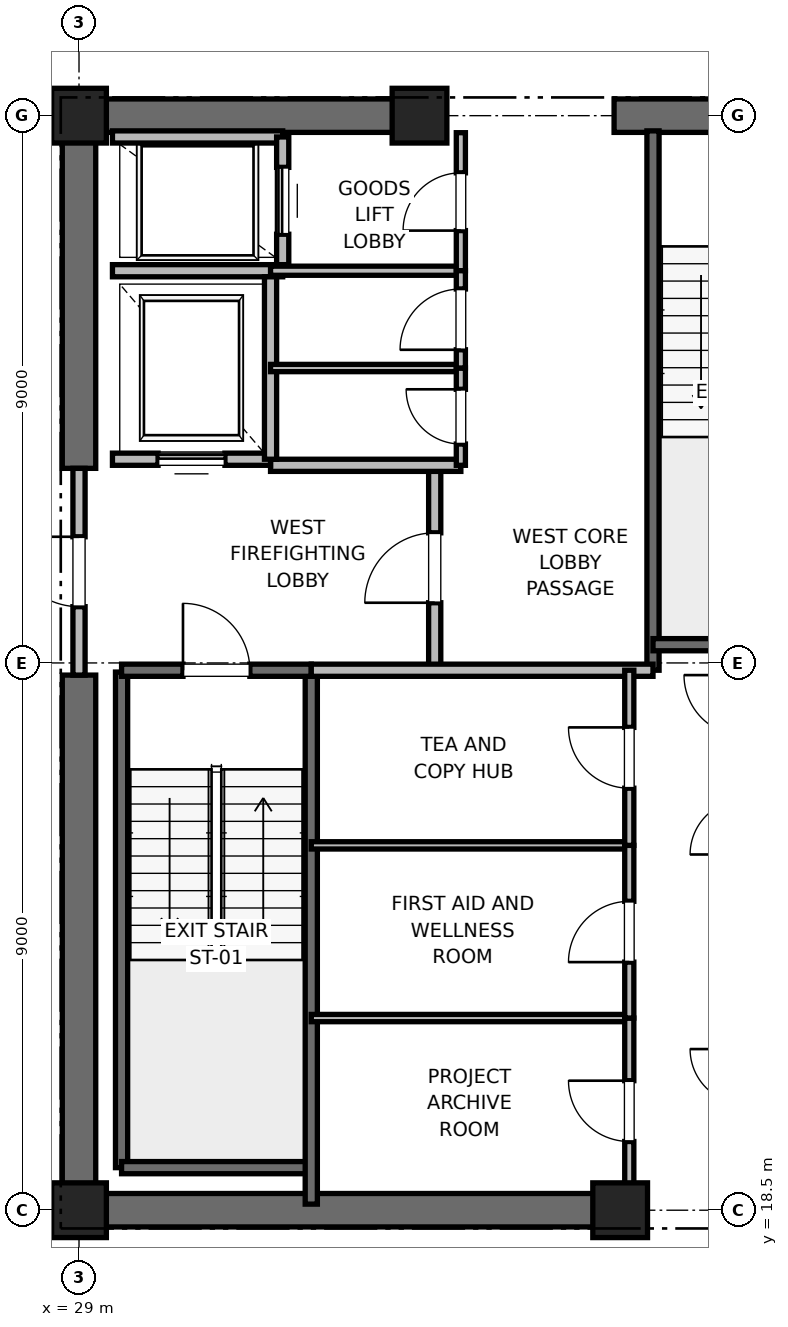
"""IFC4 building model, lengths in metres.
Left out: names, types, materials, properties, quantities, classifications, styles, units other than length and angle.
Written with IfcOpenShell. Run it as: python <this file> out.ifc"""

import sys

from ifc_helpers import new_model, si_unit, direction, frame, frame_2d, origin, origin_2d, place, context, subcontext, project, spatial, rectangle, extrude, element, fill, save


model = new_model("IFC4")
c1 = context("Model", 3, precision=1e-05, world=origin(), true_north=direction((0.0, 1.0)))
c2 = subcontext(c1, "Body", "Model", "MODEL_VIEW")
j1 = project(units=[si_unit("LENGTHUNIT", "METRE"), si_unit("PLANEANGLEUNIT", "RADIAN")], contexts=[c1])
p1 = place(None, origin())
s1 = spatial("IfcSite", under=j1, at=p1, CompositionType="ELEMENT")
p2 = place(p1, origin())
s2 = spatial("IfcBuilding", under=s1, at=p2, CompositionType="ELEMENT")
p3 = place(p2, frame((0.0, 0.0, 221.2)))
s3 = spatial("IfcBuildingStorey", under=s2, at=p3, CompositionType="ELEMENT", Elevation=221.2)
for number, where, z_axis, x_axis in (
    (1, (29.0, 18.5, 0.0), (0.0, 0.0, 1.0), (1.0, 0.0, 0.0)),
    (2, (29.0, 36.5, 0.0), (0.0, 0.0, 1.0), (1.0, 0.0, 0.0)),
    (3, (37.9, 18.5, 0.0), (0.0, 0.0, 1.0), (1.0, 0.0, 0.0)),
    (4, (34.6, 36.5, 0.0), (0.0, 0.0, 1.0), (1.0, 0.0, 0.0)),
):
    element("IfcColumn", number, at=place(p3, frame(where, z_axis=z_axis, x_axis=x_axis)), inside=s3, PredefinedType="PILASTER", context=c2, shape_type="SweptSolid", body=[
        extrude(rectangle(XDim=0.9, YDim=0.9, at=origin_2d()), origin(), (0.0, 0.0, 1.0), 4.0),
    ])
p4 = place(p3, frame((29.0, 18.5, 0.0), z_axis=(0.0, 0.0, 1.0), x_axis=(1.0, 0.0, 0.0)))
e5 = element("IfcWall", 5, at=p4, inside=s3, PredefinedType="SHEAR", context=c2, shape_type="SweptSolid", body=[
    extrude(rectangle(XDim=9.2, YDim=0.55, at=frame_2d((4.6, 0.0))), origin(), (0.0, 0.0, 1.0), 3.775),
])
p5 = place(p3, frame((29.0, 36.5, 0.0), z_axis=(0.0, 0.0, 1.0), x_axis=(1.0, 0.0, 0.0)))
e6 = element("IfcWall", 6, at=p5, inside=s3, PredefinedType="SHEAR", context=c2, shape_type="SweptSolid", body=[
    extrude(rectangle(XDim=5.8, YDim=0.55, at=frame_2d((2.9, 0.0))), origin(), (0.0, 0.0, 1.0), 3.775),
])
p6 = place(p3, frame((37.8, 36.5, 0.0), z_axis=(0.0, 0.0, 1.0), x_axis=(1.0, 0.0, 0.0)))
e7 = element("IfcWall", 7, at=p6, inside=s3, PredefinedType="SHEAR", context=c2, shape_type="SweptSolid", body=[
    extrude(rectangle(XDim=4.4, YDim=0.55, at=frame_2d((2.2, 0.0))), origin(), (0.0, 0.0, 1.0), 3.775),
])
p7 = place(p6, frame((1.65, 0.0, 0.0)))
e8 = element("IfcOpeningElement", 8, at=p7, cuts=e7, PredefinedType="OPENING", context=c2, shape_type="SweptSolid", body=[
    extrude(rectangle(XDim=1.1, YDim=2.15, at=frame_2d((0.55, 1.075))), frame((0.0, 0.275, 0.0), z_axis=(0.0, -1.0, 0.0), x_axis=(1.0, 0.0, 0.0)), (0.0, 0.0, 1.0), 0.55),
])
p8 = place(p3, frame((29.0, 18.5, 0.0), z_axis=(0.0, 0.0, 1.0), x_axis=(0.0, 1.0, 0.0)))
e9 = element("IfcWall", 9, at=p8, inside=s3, PredefinedType="SHEAR", context=c2, shape_type="SweptSolid", body=[
    extrude(rectangle(XDim=8.8, YDim=0.55, at=frame_2d((4.4, 0.0))), origin(), (0.0, 0.0, 1.0), 3.775),
])
p9 = place(p3, frame((29.0, 30.7, 0.0), z_axis=(0.0, 0.0, 1.0), x_axis=(0.0, 1.0, 0.0)))
e10 = element("IfcWall", 10, at=p9, inside=s3, PredefinedType="SHEAR", context=c2, shape_type="SweptSolid", body=[
    extrude(rectangle(XDim=5.8, YDim=0.55, at=frame_2d((2.9, 0.0))), origin(), (0.0, 0.0, 1.0), 3.775),
])
p10 = place(p3, frame((29.7, 19.2, 0.0), z_axis=(0.0, 0.0, 1.0), x_axis=(0.0, 1.0, 0.0)))
e11 = element("IfcWall", 11, at=p10, inside=s3, PredefinedType="SOLIDWALL", context=c2, shape_type="SweptSolid", body=[
    extrude(rectangle(XDim=8.15, YDim=0.2, at=frame_2d((4.075, 0.0))), origin(), (0.0, 0.0, 1.0), 3.775),
])
p11 = place(p3, frame((29.7, 19.2, 0.0), z_axis=(0.0, 0.0, 1.0), x_axis=(1.0, 0.0, 0.0)))
e12 = element("IfcWall", 12, at=p11, inside=s3, PredefinedType="SOLIDWALL", context=c2, shape_type="SweptSolid", body=[
    extrude(rectangle(XDim=3.12, YDim=0.2, at=frame_2d((1.56, 0.0))), origin(), (0.0, 0.0, 1.0), 3.775),
])
p12 = place(p3, frame((32.82, 18.6, 0.0), z_axis=(0.0, 0.0, 1.0), x_axis=(0.0, 1.0, 0.0)))
e13 = element("IfcWall", 13, at=p12, inside=s3, PredefinedType="SOLIDWALL", context=c2, shape_type="SweptSolid", body=[
    extrude(rectangle(XDim=8.78, YDim=0.2, at=frame_2d((4.39, 0.0))), origin(), (0.0, 0.0, 1.0), 3.775),
])
p13 = place(p3, frame((29.7, 27.38, 0.0), z_axis=(0.0, 0.0, 1.0), x_axis=(1.0, 0.0, 0.0)))
e14 = element("IfcWall", 14, at=p13, inside=s3, PredefinedType="SOLIDWALL", context=c2, shape_type="SweptSolid", body=[
    extrude(rectangle(XDim=3.12, YDim=0.2, at=frame_2d((1.56, 0.0))), origin(), (0.0, 0.0, 1.0), 3.775),
])
p14 = place(p13, frame((1.01, 0.0, 0.0)))
e15 = element("IfcOpeningElement", 15, at=p14, cuts=e14, PredefinedType="OPENING", context=c2, shape_type="SweptSolid", body=[
    extrude(rectangle(XDim=1.1, YDim=2.15, at=frame_2d((0.55, 1.075))), frame((0.0, 0.1, 0.0), z_axis=(0.0, -1.0, 0.0), x_axis=(1.0, 0.0, 0.0)), (0.0, 0.0, 1.0), 0.2),
])
p15 = place(p3, frame((38.44, 27.38, 0.0), z_axis=(0.0, 0.0, 1.0), x_axis=(0.0, 1.0, 0.0)))
e16 = element("IfcWall", 16, at=p15, inside=s3, PredefinedType="SOLIDWALL", context=c2, shape_type="SweptSolid", body=[
    extrude(rectangle(XDim=8.87, YDim=0.2, at=frame_2d((4.435, 0.0))), origin(), (0.0, 0.0, 1.0), 3.775),
])
p16 = place(p3, frame((38.44, 27.8, 0.0), z_axis=(0.0, 0.0, 1.0), x_axis=(1.0, 0.0, 0.0)))
e17 = element("IfcWall", 17, at=p16, inside=s3, PredefinedType="SOLIDWALL", context=c2, shape_type="SweptSolid", body=[
    extrude(rectangle(XDim=3.32, YDim=0.2, at=frame_2d((1.66, 0.0))), origin(), (0.0, 0.0, 1.0), 3.775),
])
p17 = place(p3, frame((34.85, 27.38, 0.0), z_axis=(0.0, 0.0, 1.0), x_axis=(0.0, 1.0, 0.0)))
e18 = element("IfcWall", 18, at=p17, inside=s3, PredefinedType="PARTITIONING", context=c2, shape_type="SweptSolid", body=[
    extrude(rectangle(XDim=3.37, YDim=0.2, at=frame_2d((1.685, 0.0))), origin(), (0.0, 0.0, 1.0), 3.775),
])
p18 = place(p17, frame((1.11, 0.0, 0.0)))
e19 = element("IfcOpeningElement", 19, at=p18, cuts=e18, PredefinedType="OPENING", context=c2, shape_type="SweptSolid", body=[
    extrude(rectangle(XDim=1.15, YDim=2.2, at=frame_2d((0.575, 1.1))), frame((0.0, 0.1, 0.0), z_axis=(0.0, -1.0, 0.0), x_axis=(1.0, 0.0, 0.0)), (0.0, 0.0, 1.0), 0.2),
])
p19 = place(p3, frame((29.0, 27.3, 0.0), z_axis=(0.0, 0.0, 1.0), x_axis=(0.0, 1.0, 0.0)))
e20 = element("IfcWall", 20, at=p19, inside=s3, PredefinedType="PARTITIONING", context=c2, shape_type="SweptSolid", body=[
    extrude(rectangle(XDim=3.4, YDim=0.2, at=frame_2d((1.7, 0.0))), origin(), (0.0, 0.0, 1.0), 2.755),
])
p20 = place(p19, frame((1.125, 0.0, 0.0)))
e21 = element("IfcOpeningElement", 21, at=p20, cuts=e20, PredefinedType="OPENING", context=c2, shape_type="SweptSolid", body=[
    extrude(rectangle(XDim=1.15, YDim=2.2, at=frame_2d((0.575, 1.1))), frame((0.0, 0.1, 0.0), z_axis=(0.0, -1.0, 0.0), x_axis=(1.0, 0.0, 0.0)), (0.0, 0.0, 1.0), 0.2),
])
p21 = place(p3, frame((32.82, 27.38, 0.0), z_axis=(0.0, 0.0, 1.0), x_axis=(1.0, 0.0, 0.0)))
e22 = element("IfcWall", 22, at=p21, inside=s3, PredefinedType="PARTITIONING", context=c2, shape_type="SweptSolid", body=[
    extrude(rectangle(XDim=5.62, YDim=0.2, at=frame_2d((2.81, 0.0))), origin(), (0.0, 0.0, 1.0), 3.775),
])
p22 = place(p3, frame((32.15, 30.75, 0.0), z_axis=(0.0, 0.0, 1.0), x_axis=(1.0, 0.0, 0.0)))
e23 = element("IfcWall", 23, at=p22, inside=s3, PredefinedType="PARTITIONING", context=c2, shape_type="SweptSolid", body=[
    extrude(rectangle(XDim=3.13, YDim=0.2, at=frame_2d((1.565, 0.0))), origin(), (0.0, 0.0, 1.0), 3.775),
])
p23 = place(p3, frame((29.55, 30.85, 0.0), z_axis=(0.0, 0.0, 1.0), x_axis=(1.0, 0.0, 0.0)))
e24 = element("IfcWall", 24, at=p23, inside=s3, PredefinedType="SOLIDWALL", context=c2, shape_type="SweptSolid", body=[
    extrude(rectangle(XDim=2.6, YDim=0.2, at=frame_2d((1.3, 0.0))), origin(), (0.0, 0.0, 1.0), 2.755),
])
p24 = place(p23, frame((0.75, 0.0, 0.0)))
e25 = element("IfcOpeningElement", 25, at=p24, cuts=e24, PredefinedType="OPENING", context=c2, shape_type="SweptSolid", body=[
    extrude(rectangle(XDim=1.1, YDim=2.2, at=frame_2d((0.55, 1.1))), frame((0.0, 0.1, 0.0), z_axis=(0.0, -1.0, 0.0), x_axis=(1.0, 0.0, 0.0)), (0.0, 0.0, 1.0), 0.2),
])
p25 = place(p3, frame((29.55, 33.95, 0.0), z_axis=(0.0, 0.0, 1.0), x_axis=(1.0, 0.0, 0.0)))
e26 = element("IfcWall", 26, at=p25, inside=s3, PredefinedType="SOLIDWALL", context=c2, shape_type="SweptSolid", body=[
    extrude(rectangle(XDim=2.8, YDim=0.2, at=frame_2d((1.4, 0.0))), origin(), (0.0, 0.0, 1.0), 3.775),
])
p26 = place(p3, frame((32.15, 30.85, 0.0), z_axis=(0.0, 0.0, 1.0), x_axis=(0.0, 1.0, 0.0)))
e27 = element("IfcWall", 27, at=p26, inside=s3, PredefinedType="SOLIDWALL", context=c2, shape_type="SweptSolid", body=[
    extrude(rectangle(XDim=3.0, YDim=0.2, at=frame_2d((1.5, 0.0))), origin(), (0.0, 0.0, 1.0), 3.775),
])
p27 = place(p3, frame((32.35, 36.15, 0.0), z_axis=(0.0, 0.0, 1.0), x_axis=(-1.0, 0.0, 0.0)))
e28 = element("IfcWall", 28, at=p27, inside=s3, PredefinedType="SOLIDWALL", context=c2, shape_type="SweptSolid", body=[
    extrude(rectangle(XDim=2.8, YDim=0.2, at=frame_2d((1.4, 0.0))), origin(), (0.0, 0.0, 1.0), 3.062),
])
p28 = place(p3, frame((32.35, 34.05, 0.0), z_axis=(0.0, 0.0, 1.0), x_axis=(0.0, 1.0, 0.0)))
e29 = element("IfcWall", 29, at=p28, inside=s3, PredefinedType="SOLIDWALL", context=c2, shape_type="SweptSolid", body=[
    extrude(rectangle(XDim=2.1, YDim=0.2, at=frame_2d((1.05, 0.0))), origin(), (0.0, 0.0, 1.0), 3.775),
])
p29 = place(p28, frame((0.5, 0.0, 0.0)))
e30 = element("IfcOpeningElement", 30, at=p29, cuts=e29, PredefinedType="OPENING", context=c2, shape_type="SweptSolid", body=[
    extrude(rectangle(XDim=1.1, YDim=2.2, at=frame_2d((0.55, 1.1))), frame((0.0, 0.1, 0.0), z_axis=(0.0, -1.0, 0.0), x_axis=(1.0, 0.0, 0.0)), (0.0, 0.0, 1.0), 0.2),
])
p30 = place(p3, frame((32.15, 33.95, 0.0), z_axis=(0.0, 0.0, 1.0), x_axis=(1.0, 0.0, 0.0)))
e31 = element("IfcWall", 31, at=p30, inside=s3, PredefinedType="PARTITIONING", context=c2, shape_type="SweptSolid", body=[
    extrude(rectangle(XDim=3.13, YDim=0.15, at=frame_2d((1.565, 0.0))), origin(), (0.0, 0.0, 1.0), 2.85),
])
p31 = place(p3, frame((35.28, 33.95, 0.0), z_axis=(0.0, 0.0, 1.0), x_axis=(0.0, 1.0, 0.0)))
e32 = element("IfcWall", 32, at=p31, inside=s3, PredefinedType="PARTITIONING", context=c2, shape_type="SweptSolid", body=[
    extrude(rectangle(XDim=2.27, YDim=0.15, at=frame_2d((1.135, 0.0))), origin(), (0.0, 0.0, 1.0), 2.755),
])
p32 = place(p31, frame((0.66, 0.0, 0.0)))
e33 = element("IfcOpeningElement", 33, at=p32, cuts=e32, PredefinedType="OPENING", context=c2, shape_type="SweptSolid", body=[
    extrude(rectangle(XDim=0.95, YDim=2.15, at=frame_2d((0.475, 1.075))), frame((0.0, 0.075, 0.0), z_axis=(0.0, -1.0, 0.0), x_axis=(1.0, 0.0, 0.0)), (0.0, 0.0, 1.0), 0.15),
])
p33 = place(p3, frame((32.15, 32.35, 0.0), z_axis=(0.0, 0.0, 1.0), x_axis=(1.0, 0.0, 0.0)))
e34 = element("IfcWall", 34, at=p33, inside=s3, PredefinedType="PARTITIONING", context=c2, shape_type="SweptSolid", body=[
    extrude(rectangle(XDim=3.13, YDim=0.12, at=frame_2d((1.565, 0.0))), origin(), (0.0, 0.0, 1.0), 2.85),
])
p34 = place(p3, frame((35.28, 30.75, 0.0), z_axis=(0.0, 0.0, 1.0), x_axis=(0.0, 1.0, 0.0)))
e35 = element("IfcWall", 35, at=p34, inside=s3, PredefinedType="PARTITIONING", context=c2, shape_type="SweptSolid", body=[
    extrude(rectangle(XDim=1.6, YDim=0.15, at=frame_2d((0.8, 0.0))), origin(), (0.0, 0.0, 1.0), 2.85),
])
p35 = place(p34, frame((0.35, 0.0, 0.0)))
e36 = element("IfcOpeningElement", 36, at=p35, cuts=e35, PredefinedType="OPENING", context=c2, shape_type="SweptSolid", body=[
    extrude(rectangle(XDim=0.9, YDim=2.1, at=frame_2d((0.45, 1.05))), frame((0.0, 0.075, 0.0), z_axis=(0.0, -1.0, 0.0), x_axis=(1.0, 0.0, 0.0)), (0.0, 0.0, 1.0), 0.15),
])
p36 = place(p3, frame((35.28, 32.35, 0.0), z_axis=(0.0, 0.0, 1.0), x_axis=(0.0, 1.0, 0.0)))
e37 = element("IfcWall", 37, at=p36, inside=s3, PredefinedType="PARTITIONING", context=c2, shape_type="SweptSolid", body=[
    extrude(rectangle(XDim=1.6, YDim=0.15, at=frame_2d((0.8, 0.0))), origin(), (0.0, 0.0, 1.0), 2.85),
])
p37 = place(p36, frame((0.3, 0.0, 0.0)))
e38 = element("IfcOpeningElement", 38, at=p37, cuts=e37, PredefinedType="OPENING", context=c2, shape_type="SweptSolid", body=[
    extrude(rectangle(XDim=1.0, YDim=2.15, at=frame_2d((0.5, 1.075))), frame((0.0, 0.075, 0.0), z_axis=(0.0, -1.0, 0.0), x_axis=(1.0, 0.0, 0.0)), (0.0, 0.0, 1.0), 0.15),
])
for number, where, z_axis, x_axis in (
    (39, (32.82, 21.66, 0.0), (0.0, 0.0, 1.0), (1.0, 0.0, 0.0)),
    (40, (32.82, 24.5, 0.0), (0.0, 0.0, 1.0), (1.0, 0.0, 0.0)),
):
    element("IfcWall", number, at=place(p3, frame(where, z_axis=z_axis, x_axis=x_axis)), inside=s3, PredefinedType="PARTITIONING", context=c2, shape_type="SweptSolid", body=[
        extrude(rectangle(XDim=5.23, YDim=0.12, at=frame_2d((2.615, 0.0))), origin(), (0.0, 0.0, 1.0), 2.85),
    ])
p38 = place(p3, frame((38.05, 18.6, 0.0), z_axis=(0.0, 0.0, 1.0), x_axis=(0.0, 1.0, 0.0)))
e41 = element("IfcWall", 41, at=p38, inside=s3, PredefinedType="PARTITIONING", context=c2, shape_type="SweptSolid", body=[
    extrude(rectangle(XDim=3.06, YDim=0.15, at=frame_2d((1.53, 0.0))), origin(), (0.0, 0.0, 1.0), 2.755),
])
p39 = place(p38, frame((1.03, 0.0, 0.0)))
e42 = element("IfcOpeningElement", 42, at=p39, cuts=e41, PredefinedType="OPENING", context=c2, shape_type="SweptSolid", body=[
    extrude(rectangle(XDim=1.0, YDim=2.15, at=frame_2d((0.5, 1.075))), frame((0.0, 0.075, 0.0), z_axis=(0.0, -1.0, 0.0), x_axis=(1.0, 0.0, 0.0)), (0.0, 0.0, 1.0), 0.15),
])
p40 = place(p3, frame((38.05, 21.66, 0.0), z_axis=(0.0, 0.0, 1.0), x_axis=(0.0, 1.0, 0.0)))
e43 = element("IfcWall", 43, at=p40, inside=s3, PredefinedType="PARTITIONING", context=c2, shape_type="SweptSolid", body=[
    extrude(rectangle(XDim=2.84, YDim=0.15, at=frame_2d((1.42, 0.0))), origin(), (0.0, 0.0, 1.0), 2.85),
])
p41 = place(p40, frame((0.92, 0.0, 0.0)))
e44 = element("IfcOpeningElement", 44, at=p41, cuts=e43, PredefinedType="OPENING", context=c2, shape_type="SweptSolid", body=[
    extrude(rectangle(XDim=1.0, YDim=2.15, at=frame_2d((0.5, 1.075))), frame((0.0, 0.075, 0.0), z_axis=(0.0, -1.0, 0.0), x_axis=(1.0, 0.0, 0.0)), (0.0, 0.0, 1.0), 0.15),
])
p42 = place(p3, frame((38.05, 24.5, 0.0), z_axis=(0.0, 0.0, 1.0), x_axis=(0.0, 1.0, 0.0)))
e45 = element("IfcWall", 45, at=p42, inside=s3, PredefinedType="PARTITIONING", context=c2, shape_type="SweptSolid", body=[
    extrude(rectangle(XDim=2.88, YDim=0.15, at=frame_2d((1.44, 0.0))), origin(), (0.0, 0.0, 1.0), 2.85),
])
p43 = place(p42, frame((0.94, 0.0, 0.0)))
e46 = element("IfcOpeningElement", 46, at=p43, cuts=e45, PredefinedType="OPENING", context=c2, shape_type="SweptSolid", body=[
    extrude(rectangle(XDim=1.0, YDim=2.15, at=frame_2d((0.5, 1.075))), frame((0.0, 0.075, 0.0), z_axis=(0.0, -1.0, 0.0), x_axis=(1.0, 0.0, 0.0)), (0.0, 0.0, 1.0), 0.15),
])
p44 = place(p14, origin())
e47 = element("IfcDoor", 47, at=p44, inside=s3, OperationType="SINGLE_SWING_LEFT", PredefinedType="DOOR", context=c2, shape_type="SweptSolid", body=[
    extrude(rectangle(XDim=1.1, YDim=2.15, at=frame_2d((0.55, 1.075))), frame((0.0, 0.025, 0.0), z_axis=(0.0, -1.0, 0.0), x_axis=(1.0, 0.0, 0.0)), (0.0, 0.0, 1.0), 0.05),
])
fill(e15, e47)
p45 = place(p18, origin())
e48 = element("IfcDoor", 48, at=p45, inside=s3, OperationType="SINGLE_SWING_LEFT", PredefinedType="DOOR", context=c2, shape_type="SweptSolid", body=[
    extrude(rectangle(XDim=1.15, YDim=2.2, at=frame_2d((0.575, 1.1))), frame((0.0, 0.025, 0.0), z_axis=(0.0, -1.0, 0.0), x_axis=(1.0, 0.0, 0.0)), (0.0, 0.0, 1.0), 0.05),
])
fill(e19, e48)
p46 = place(p20, origin())
e49 = element("IfcDoor", 49, at=p46, inside=s3, OperationType="SINGLE_SWING_RIGHT", PredefinedType="DOOR", context=c2, shape_type="SweptSolid", body=[
    extrude(rectangle(XDim=1.15, YDim=2.2, at=frame_2d((0.575, 1.1))), frame((0.0, 0.025, 0.0), z_axis=(0.0, -1.0, 0.0), x_axis=(1.0, 0.0, 0.0)), (0.0, 0.0, 1.0), 0.05),
])
fill(e21, e49)
p47 = place(p24, origin())
e50 = element("IfcDoor", 50, at=p47, inside=s3, OperationType="SLIDING_TO_RIGHT", PredefinedType="DOOR", context=c2, shape_type="SweptSolid", body=[
    extrude(rectangle(XDim=1.1, YDim=2.2, at=frame_2d((0.55, 1.1))), frame((0.0, 0.025, 0.0), z_axis=(0.0, -1.0, 0.0), x_axis=(1.0, 0.0, 0.0)), (0.0, 0.0, 1.0), 0.05),
])
fill(e25, e50)
p48 = place(p29, origin())
e51 = element("IfcDoor", 51, at=p48, inside=s3, OperationType="SLIDING_TO_RIGHT", PredefinedType="DOOR", context=c2, shape_type="SweptSolid", body=[
    extrude(rectangle(XDim=1.1, YDim=2.2, at=frame_2d((0.55, 1.1))), frame((0.0, 0.025, 0.0), z_axis=(0.0, -1.0, 0.0), x_axis=(1.0, 0.0, 0.0)), (0.0, 0.0, 1.0), 0.05),
])
fill(e30, e51)
p49 = place(p32, origin())
e52 = element("IfcDoor", 52, at=p49, inside=s3, OperationType="SINGLE_SWING_LEFT", PredefinedType="DOOR", context=c2, shape_type="SweptSolid", body=[
    extrude(rectangle(XDim=0.95, YDim=2.15, at=frame_2d((0.475, 1.075))), frame((0.0, 0.025, 0.0), z_axis=(0.0, -1.0, 0.0), x_axis=(1.0, 0.0, 0.0)), (0.0, 0.0, 1.0), 0.05),
])
fill(e33, e52)
p50 = place(p35, origin())
e53 = element("IfcDoor", 53, at=p50, inside=s3, OperationType="SINGLE_SWING_RIGHT", PredefinedType="DOOR", context=c2, shape_type="SweptSolid", body=[
    extrude(rectangle(XDim=0.9, YDim=2.1, at=frame_2d((0.45, 1.05))), frame((0.0, 0.025, 0.0), z_axis=(0.0, -1.0, 0.0), x_axis=(1.0, 0.0, 0.0)), (0.0, 0.0, 1.0), 0.05),
])
fill(e36, e53)
p51 = place(p37, origin())
e54 = element("IfcDoor", 54, at=p51, inside=s3, OperationType="SINGLE_SWING_LEFT", PredefinedType="DOOR", context=c2, shape_type="SweptSolid", body=[
    extrude(rectangle(XDim=1.0, YDim=2.15, at=frame_2d((0.5, 1.075))), frame((0.0, 0.025, 0.0), z_axis=(0.0, -1.0, 0.0), x_axis=(1.0, 0.0, 0.0)), (0.0, 0.0, 1.0), 0.05),
])
fill(e38, e54)
p52 = place(p39, origin())
e55 = element("IfcDoor", 55, at=p52, inside=s3, OperationType="SINGLE_SWING_RIGHT", PredefinedType="DOOR", context=c2, shape_type="SweptSolid", body=[
    extrude(rectangle(XDim=1.0, YDim=2.15, at=frame_2d((0.5, 1.075))), frame((0.0, 0.025, 0.0), z_axis=(0.0, -1.0, 0.0), x_axis=(1.0, 0.0, 0.0)), (0.0, 0.0, 1.0), 0.05),
])
fill(e42, e55)
p53 = place(p41, origin())
e56 = element("IfcDoor", 56, at=p53, inside=s3, OperationType="SINGLE_SWING_LEFT", PredefinedType="DOOR", context=c2, shape_type="SweptSolid", body=[
    extrude(rectangle(XDim=1.0, YDim=2.15, at=frame_2d((0.5, 1.075))), frame((0.0, 0.025, 0.0), z_axis=(0.0, -1.0, 0.0), x_axis=(1.0, 0.0, 0.0)), (0.0, 0.0, 1.0), 0.05),
])
fill(e44, e56)
p54 = place(p43, origin())
e57 = element("IfcDoor", 57, at=p54, inside=s3, OperationType="SINGLE_SWING_RIGHT", PredefinedType="DOOR", context=c2, shape_type="SweptSolid", body=[
    extrude(rectangle(XDim=1.0, YDim=2.15, at=frame_2d((0.5, 1.075))), frame((0.0, 0.025, 0.0), z_axis=(0.0, -1.0, 0.0), x_axis=(1.0, 0.0, 0.0)), (0.0, 0.0, 1.0), 0.05),
])
fill(e46, e57)
save(model, sys.argv[1])
